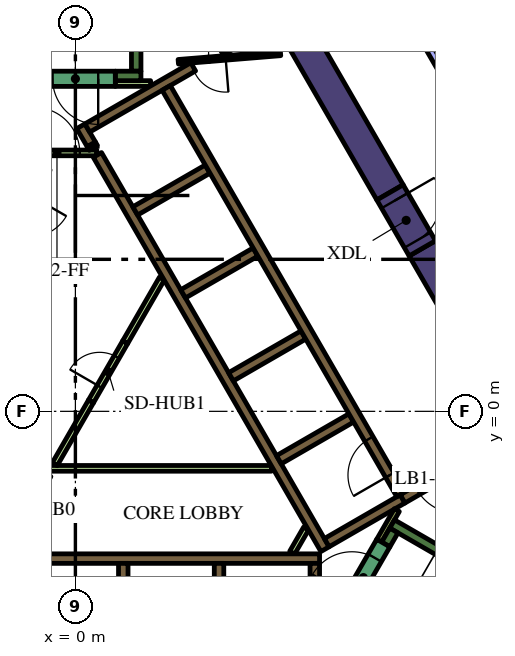
"""IFC4 building model, lengths in metres.
Left out: names, types, materials, properties, quantities, classifications, styles, units other than length and angle.
Written with IfcOpenShell. Run it as: python <this file> out.ifc"""

import sys

from ifc_helpers import new_model, si_unit, direction, frame, frame_2d, origin, place, context, subcontext, project, spatial, rectangle, extrude, element, fill, save


model = new_model("IFC4")
c1 = context("Model", 3, precision=1e-05, world=origin(), true_north=direction((0.0, 1.0)))
c2 = subcontext(c1, "Body", "Model", "MODEL_VIEW")
j1 = project(units=[si_unit("LENGTHUNIT", "METRE"), si_unit("PLANEANGLEUNIT", "RADIAN")], contexts=[c1])
p1 = place(None, origin())
s1 = spatial("IfcSite", under=j1, at=p1, CompositionType="ELEMENT")
p2 = place(p1, origin())
s2 = spatial("IfcBuilding", under=s1, at=p2, CompositionType="ELEMENT")
p3 = place(p2, frame((0.0, 0.0, 175.2)))
s3 = spatial("IfcBuildingStorey", under=s2, at=p3, CompositionType="ELEMENT", Elevation=175.2)
p4 = place(p3, frame((9.129, 4.289, 0.0), z_axis=(0.0, 0.0, 1.0), x_axis=(0.499995742806, -0.866027861663, 0.0)))
e1 = element("IfcWall", 1, at=p4, inside=s3, PredefinedType="SOLIDWALL", context=c2, shape_type="SweptSolid", body=[
    extrude(rectangle(XDim=12.527, YDim=0.8, at=frame_2d((6.264, 0.0))), origin(), (0.0, 0.0, 1.0), 4.2),
])
p5 = place(p3, frame((8.279, 5.761, 0.0), z_axis=(0.0, 0.0, 1.0), x_axis=(-0.500010359015, 0.866019422922, 0.0)))
e2 = element("IfcWall", 2, at=p5, inside=s3, PredefinedType="SOLIDWALL", context=c2, shape_type="SweptSolid", body=[
    extrude(rectangle(XDim=12.528, YDim=0.8, at=frame_2d((6.264, 0.0))), origin(), (0.0, 0.0, 1.0), 4.2),
])
p6 = place(p3, frame((8.334, -2.964, 0.0), z_axis=(0.0, 0.0, 1.0), x_axis=(0.866016039709, -0.500016218704, 0.0)))
e3 = element("IfcWall", 3, at=p6, inside=s3, PredefinedType="SOLIDWALL", context=c2, shape_type="SweptSolid", body=[
    extrude(rectangle(XDim=7.05, YDim=0.25, at=frame_2d((3.525, 0.0))), origin(), (0.0, 0.0, 1.0), 4.2),
])
p7 = place(p3, frame((8.168, -3.503, 0.0), z_axis=(0.0, 0.0, 1.0), x_axis=(0.49972245349, 0.866185586049, 0.0)))
e4 = element("IfcWall", 4, at=p7, inside=s3, PredefinedType="SOLIDWALL", context=c2, shape_type="SweptSolid", body=[
    extrude(rectangle(XDim=0.425, YDim=0.25, at=frame_2d((0.212, 0.0))), origin(), (0.0, 0.0, 1.0), 4.2),
])
p8 = place(p3, frame((1.6, 8.95, 0.0), z_axis=(0.0, 0.0, 1.0), x_axis=(0.0, 1.0, 0.0)))
e5 = element("IfcWall", 5, at=p8, inside=s3, PredefinedType="SOLIDWALL", context=c2, shape_type="SweptSolid", body=[
    extrude(rectangle(XDim=6.8, YDim=0.25, at=frame_2d((3.4, 0.0))), origin(), (0.0, 0.0, 1.0), 4.2),
])
p9 = place(p3, frame((1.05, 8.825, 0.0), z_axis=(0.0, 0.0, 1.0), x_axis=(1.0, 0.0, 0.0)))
e6 = element("IfcWall", 6, at=p9, inside=s3, PredefinedType="SOLIDWALL", context=c2, shape_type="SweptSolid", body=[
    extrude(rectangle(XDim=0.675, YDim=0.25, at=frame_2d((0.337, 0.0))), origin(), (0.0, 0.0, 1.0), 4.2),
])
p10 = place(p3, frame((-5.545, -3.875, 0.0), z_axis=(0.0, 0.0, 1.0), x_axis=(1.0, 0.0, 0.0)))
e7 = element("IfcWall", 7, at=p10, inside=s3, PredefinedType="SOLIDWALL", context=c2, shape_type="SweptSolid", body=[
    extrude(rectangle(XDim=11.97, YDim=0.25, at=frame_2d((5.985, 0.0))), origin(), (0.0, 0.0, 1.0), 4.2),
])
p11 = place(p3, frame((6.3, -7.24, 0.0), z_axis=(0.0, 0.0, 1.0), x_axis=(0.0, 1.0, 0.0)))
e8 = element("IfcWall", 8, at=p11, inside=s3, PredefinedType="SOLIDWALL", context=c2, shape_type="SweptSolid", body=[
    extrude(rectangle(XDim=3.24, YDim=0.25, at=frame_2d((1.62, 0.0))), origin(), (0.0, 0.0, 1.0), 4.2),
])
for number, where, z_axis, x_axis in (
    (9, (3.78, -4.0, 0.0), (0.0, 0.0, 1.0), (0.0, -1.0, 0.0)),
    (10, (1.26, -4.0, 0.0), (0.0, 0.0, 1.0), (0.0, -1.0, 0.0)),
):
    element("IfcWall", number, at=place(p3, frame(where, z_axis=z_axis, x_axis=x_axis)), inside=s3, PredefinedType="SOLIDWALL", context=c2, shape_type="SweptSolid", body=[
        extrude(rectangle(XDim=2.2, YDim=0.25, at=frame_2d((1.1, 0.0))), origin(), (0.0, 0.0, 1.0), 4.2),
    ])
p12 = place(p3, frame((0.473, 6.93, 0.0), z_axis=(0.0, 0.0, 1.0), x_axis=(-0.49972245349, 0.866185586049, 0.0)))
e11 = element("IfcWall", 11, at=p12, inside=s3, PredefinedType="SOLIDWALL", context=c2, shape_type="SweptSolid", body=[
    extrude(rectangle(XDim=0.11, YDim=0.25, at=frame_2d((0.055, 0.0))), origin(), (0.0, 0.0, 1.0), 4.2),
])
p13 = place(p3, frame((6.568, -3.627, 0.0), z_axis=(0.0, 0.0, 1.0), x_axis=(-0.499999455981, 0.866025717874, 0.0)))
e12 = element("IfcWall", 12, at=p13, inside=s3, PredefinedType="SOLIDWALL", context=c2, shape_type="SweptSolid", body=[
    extrude(rectangle(XDim=11.978, YDim=0.25, at=frame_2d((5.989, 0.0))), origin(), (0.0, 0.0, 1.0), 4.2),
])
p14 = place(p3, frame((0.417, 7.027, 0.0), z_axis=(0.0, 0.0, 1.0), x_axis=(-0.500210807569, 0.865903659763, 0.0)))
e13 = element("IfcWall", 13, at=p14, inside=s3, PredefinedType="SOLIDWALL", context=c2, shape_type="SweptSolid", body=[
    extrude(rectangle(XDim=0.548, YDim=0.25, at=frame_2d((0.274, 0.0))), origin(), (0.0, 0.0, 1.0), 4.2),
])
p15 = place(p3, frame((3.1, 9.064, 0.0), z_axis=(0.0, 0.0, 1.0), x_axis=(-0.866030133475, -0.499991807846, 0.0)))
e14 = element("IfcWall", 14, at=p15, inside=s3, PredefinedType="SOLIDWALL", context=c2, shape_type="SweptSolid", body=[
    extrude(rectangle(XDim=3.217, YDim=0.25, at=frame_2d((1.608, 0.0))), origin(), (0.0, 0.0, 1.0), 4.2),
])
p16 = place(p3, frame((1.574, 5.274, 0.0), z_axis=(0.0, 0.0, 1.0), x_axis=(0.866028486751, 0.499994660107, 0.0)))
e15 = element("IfcWall", 15, at=p16, inside=s3, PredefinedType="SOLIDWALL", context=c2, shape_type="SweptSolid", body=[
    extrude(rectangle(XDim=2.2, YDim=0.25, at=frame_2d((1.1, 0.0))), origin(), (0.0, 0.0, 1.0), 4.2),
])
for number, where, z_axis, x_axis in (
    (16, (2.834, 3.091, 0.0), (0.0, 0.0, 1.0), (0.866, 0.5, 0.0)),
    (17, (4.094, 0.909, 0.0), (0.0, 0.0, 1.0), (0.866, 0.5, 0.0)),
    (18, (5.354, -1.274, 0.0), (0.0, 0.0, 1.0), (0.866, 0.5, 0.0)),
):
    element("IfcWall", number, at=place(p3, frame(where, z_axis=z_axis, x_axis=x_axis)), inside=s3, PredefinedType="SOLIDWALL", context=c2, shape_type="SweptSolid", body=[
        extrude(rectangle(XDim=2.2, YDim=0.25, at=frame_2d((1.1, 0.0))), origin(), (0.0, 0.0, 1.0), 4.2),
    ])
p17 = place(p3, frame((6.614, -3.456, 0.0), z_axis=(0.0, 0.0, 1.0), x_axis=(0.866025089694, 0.500000544019, 0.0)))
e19 = element("IfcWall", 19, at=p17, inside=s3, PredefinedType="SOLIDWALL", context=c2, shape_type="SweptSolid", body=[
    extrude(rectangle(XDim=2.305, YDim=0.25, at=frame_2d((1.153, 0.0))), origin(), (0.0, 0.0, 1.0), 4.2),
])
p18 = place(p3, frame((3.83, 9.486, 0.0), z_axis=(0.0, 0.0, 1.0), x_axis=(0.865986202621, 0.500067892261, 0.0)))
e20 = element("IfcWall", 20, at=p18, inside=s3, PredefinedType="SOLIDWALL", context=c2, shape_type="SweptSolid", body=[
    extrude(rectangle(XDim=1.591, YDim=0.25, at=frame_2d((0.795, 0.0))), origin(), (0.0, 0.0, 1.0), 4.2),
])
p19 = place(p3, frame((1.05, 8.625, 0.0), z_axis=(0.0, 0.0, 1.0), x_axis=(1.0, 0.0, 0.0)))
e21 = element("IfcWall", 21, at=p19, inside=s3, PredefinedType="PARTITIONING", context=c2, shape_type="SweptSolid", body=[
    extrude(rectangle(XDim=0.929, YDim=0.15, at=frame_2d((0.464, 0.0))), origin(), (0.0, 0.0, 1.0), 3.15),
])
p20 = place(p3, frame((8.459, -2.599, 0.0), z_axis=(0.0, 0.0, 1.0), x_axis=(-0.500041054325, -0.866001699761, 0.0)))
e22 = element("IfcWall", 22, at=p20, inside=s3, PredefinedType="PARTITIONING", context=c2, shape_type="SweptSolid", body=[
    extrude(rectangle(XDim=0.929, YDim=0.15, at=frame_2d((0.464, 0.0))), origin(), (0.0, 0.0, 1.0), 4.2),
])
p21 = place(p3, frame((5.705, -3.718, 0.0), z_axis=(0.0, 0.0, 1.0), x_axis=(0.499962090823, 0.866047289552, 0.0)))
e23 = element("IfcWall", 23, at=p21, inside=s3, PredefinedType="PARTITIONING", context=c2, shape_type="SweptSolid", body=[
    extrude(rectangle(XDim=0.735, YDim=0.15, at=frame_2d((0.367, 0.0))), origin(), (0.0, 0.0, 1.0), 3.15),
])
p22 = place(p3, frame((-4.2, -1.5, 0.0), z_axis=(0.0, 0.0, 1.0), x_axis=(1.0, 0.0, 0.0)))
e24 = element("IfcWall", 24, at=p22, inside=s3, PredefinedType="PARTITIONING", context=c2, shape_type="SweptSolid", body=[
    extrude(rectangle(XDim=9.359, YDim=0.15, at=frame_2d((4.68, 0.0))), origin(), (0.0, 0.0, 1.0), 3.15),
])
p23 = place(p3, frame((-0.544, -1.393, 0.0), z_axis=(0.0, 0.0, 1.0), x_axis=(0.499928740635, 0.866066541489, 0.0)))
e25 = element("IfcWall", 25, at=p23, inside=s3, PredefinedType="PARTITIONING", context=c2, shape_type="SweptSolid", body=[
    extrude(rectangle(XDim=1.912, YDim=0.15, at=frame_2d((0.956, 0.0))), origin(), (0.0, 0.0, 1.0), 3.15),
])
p24 = place(p3, frame((1.312, 1.822, 0.0), z_axis=(0.0, 0.0, 1.0), x_axis=(0.500003549559, 0.866023354436, 0.0)))
e26 = element("IfcWall", 26, at=p24, inside=s3, PredefinedType="PARTITIONING", context=c2, shape_type="SweptSolid", body=[
    extrude(rectangle(XDim=1.93, YDim=0.15, at=frame_2d((0.965, 0.0))), origin(), (0.0, 0.0, 1.0), 3.15),
])
p25 = place(p3, frame((8.565, -2.185, 0.0), z_axis=(0.0, 0.0, 1.0), x_axis=(-0.499997954832, 0.866026584559, 0.0)))
e27 = element("IfcWall", 27, at=p25, inside=s3, PredefinedType="SOLIDWALL", context=c2, shape_type="SweptSolid", body=[
    extrude(rectangle(XDim=12.35, YDim=0.25, at=frame_2d((6.175, 0.0))), origin(), (0.0, 0.0, 1.0), 4.2),
])
p26 = place(p25, frame((0.585, 0.0, 0.0)))
e28 = element("IfcOpeningElement", 28, at=p26, cuts=e27, PredefinedType="OPENING", context=c2, shape_type="SweptSolid", body=[
    extrude(rectangle(XDim=1.1, YDim=2.1, at=frame_2d((0.55, 1.05))), frame((0.0, 0.135, 0.0), z_axis=(0.0, -1.0, 0.0), x_axis=(1.0, 0.0, 0.0)), (0.0, 0.0, 1.0), 0.27),
])
p27 = place(p3, frame((7.053, -5.284, 0.0), z_axis=(0.0, 0.0, 1.0), x_axis=(0.500078061341, 0.865980330357, 0.0)))
e29 = element("IfcWall", 29, at=p27, inside=s3, PredefinedType="SOLIDWALL", context=c2, shape_type="SweptSolid", body=[
    extrude(rectangle(XDim=2.1, YDim=0.4, at=frame_2d((1.05, 0.0))), origin(), (0.0, 0.0, 1.0), 4.2),
])
p28 = place(p27, frame((0.45, 0.0, 0.0)))
e30 = element("IfcOpeningElement", 30, at=p28, cuts=e29, PredefinedType="OPENING", context=c2, shape_type="SweptSolid", body=[
    extrude(rectangle(XDim=1.2, YDim=2.1, at=frame_2d((0.6, 1.05))), frame((0.0, 0.21, 0.0), z_axis=(0.0, -1.0, 0.0), x_axis=(1.0, 0.0, 0.0)), (0.0, 0.0, 1.0), 0.42),
])
p29 = place(p3, frame((1.05, 8.75, 0.0), z_axis=(0.0, 0.0, 1.0), x_axis=(-1.0, 0.0, 0.0)))
e31 = element("IfcWall", 31, at=p29, inside=s3, PredefinedType="SOLIDWALL", context=c2, shape_type="SweptSolid", body=[
    extrude(rectangle(XDim=2.1, YDim=0.4, at=frame_2d((1.05, 0.0))), origin(), (0.0, 0.0, 1.0), 4.2),
])
p30 = place(p29, frame((0.45, 0.0, 0.0)))
e32 = element("IfcOpeningElement", 32, at=p30, cuts=e31, PredefinedType="OPENING", context=c2, shape_type="SweptSolid", body=[
    extrude(rectangle(XDim=1.2, YDim=2.1, at=frame_2d((0.6, 1.05))), frame((0.0, 0.21, 0.0), z_axis=(0.0, -1.0, 0.0), x_axis=(1.0, 0.0, 0.0)), (0.0, 0.0, 1.0), 0.42),
])
p31 = place(p3, frame((5.398, 9.419, 0.0), z_axis=(0.0, 0.0, 1.0), x_axis=(-0.996653416376, -0.081743303248, 0.0)))
e33 = element("IfcWall", 33, at=p31, inside=s3, PredefinedType="PARTITIONING", context=c2, shape_type="SweptSolid", body=[
    extrude(rectangle(XDim=2.7, YDim=0.12, at=frame_2d((1.35, 0.0))), origin(), (0.0, 0.0, 1.0), 3.15),
])
p32 = place(p31, frame((1.45, 0.0, 0.0)))
e34 = element("IfcOpeningElement", 34, at=p32, cuts=e33, PredefinedType="OPENING", context=c2, shape_type="SweptSolid", body=[
    extrude(rectangle(XDim=0.9, YDim=2.1, at=frame_2d((0.45, 1.05))), frame((0.0, 0.07, 0.0), z_axis=(0.0, -1.0, 0.0), x_axis=(1.0, 0.0, 0.0)), (0.0, 0.0, 1.0), 0.14),
])
p33 = place(p3, frame((-1.534, 6.8, 0.0), z_axis=(0.0, 0.0, 1.0), x_axis=(1.0, 0.0, 0.0)))
e35 = element("IfcWall", 35, at=p33, inside=s3, PredefinedType="PARTITIONING", context=c2, shape_type="SweptSolid", body=[
    extrude(rectangle(XDim=2.1, YDim=0.15, at=frame_2d((1.05, 0.0))), origin(), (0.0, 0.0, 1.0), 3.15),
])
p34 = place(p33, frame((0.45, 0.0, 0.0)))
e36 = element("IfcOpeningElement", 36, at=p34, cuts=e35, PredefinedType="OPENING", context=c2, shape_type="SweptSolid", body=[
    extrude(rectangle(XDim=1.2, YDim=2.1, at=frame_2d((0.6, 1.05))), frame((0.0, 0.085, 0.0), z_axis=(0.0, -1.0, 0.0), x_axis=(1.0, 0.0, 0.0)), (0.0, 0.0, 1.0), 0.17),
])
p35 = place(p3, frame((10.429, -1.253, 0.0), z_axis=(0.0, 0.0, 1.0), x_axis=(-0.866009402589, -0.500027713859, 0.0)))
e37 = element("IfcWall", 37, at=p35, inside=s3, PredefinedType="SOLIDWALL", context=c2, shape_type="SweptSolid", body=[
    extrude(rectangle(XDim=2.1, YDim=0.25, at=frame_2d((1.05, 0.0))), origin(), (0.0, 0.0, 1.0), 4.2),
])
p36 = place(p35, frame((0.45, 0.0, 0.0)))
e38 = element("IfcOpeningElement", 38, at=p36, cuts=e37, PredefinedType="OPENING", context=c2, shape_type="SweptSolid", body=[
    extrude(rectangle(XDim=1.2, YDim=2.1, at=frame_2d((0.6, 1.05))), frame((0.0, 0.135, 0.0), z_axis=(0.0, -1.0, 0.0), x_axis=(1.0, 0.0, 0.0)), (0.0, 0.0, 1.0), 0.27),
])
p37 = place(p3, frame((8.279, 5.761, 0.0), z_axis=(0.0, 0.0, 1.0), x_axis=(0.500062241894, -0.865989465428, 0.0)))
e39 = element("IfcWall", 39, at=p37, inside=s3, PredefinedType="SOLIDWALL", context=c2, shape_type="SweptSolid", body=[
    extrude(rectangle(XDim=1.7, YDim=0.8, at=frame_2d((0.85, 0.0))), origin(), (0.0, 0.0, 1.0), 4.2),
])
p38 = place(p37, frame((0.25, 0.0, 0.0)))
e40 = element("IfcOpeningElement", 40, at=p38, cuts=e39, PredefinedType="OPENING", context=c2, shape_type="SweptSolid", body=[
    extrude(rectangle(XDim=1.2, YDim=2.1, at=frame_2d((0.6, 1.05))), frame((0.0, 0.41, 0.0), z_axis=(0.0, -1.0, 0.0), x_axis=(1.0, 0.0, 0.0)), (0.0, 0.0, 1.0), 0.82),
])
p39 = place(p3, frame((0.412, 0.263, 0.0), z_axis=(0.0, 0.0, 1.0), x_axis=(0.500062916607, 0.865989075817, 0.0)))
e41 = element("IfcWall", 41, at=p39, inside=s3, PredefinedType="PARTITIONING", context=c2, shape_type="SweptSolid", body=[
    extrude(rectangle(XDim=1.8, YDim=0.15, at=frame_2d((0.9, 0.0))), origin(), (0.0, 0.0, 1.0), 3.15),
])
p40 = place(p39, frame((0.45, 0.0, 0.0)))
e42 = element("IfcOpeningElement", 42, at=p40, cuts=e41, PredefinedType="OPENING", context=c2, shape_type="SweptSolid", body=[
    extrude(rectangle(XDim=0.9, YDim=2.1, at=frame_2d((0.45, 1.05))), frame((0.0, 0.085, 0.0), z_axis=(0.0, -1.0, 0.0), x_axis=(1.0, 0.0, 0.0)), (0.0, 0.0, 1.0), 0.17),
])
p41 = place(p3, frame((13.13, 2.958, 0.0), z_axis=(0.0, 0.0, 1.0), x_axis=(-0.499995158272, 0.866028199139, 0.0)))
e43 = element("IfcWall", 43, at=p41, inside=s3, PredefinedType="PARTITIONING", context=c2, shape_type="SweptSolid", body=[
    extrude(rectangle(XDim=8.008, YDim=0.2, at=frame_2d((4.004, 0.0))), origin(), (0.0, 0.0, 1.0), 3.15),
])
p42 = place(p26, origin())
e44 = element("IfcDoor", 44, at=p42, inside=s3, OperationType="DOUBLE_DOOR_SLIDING", PredefinedType="DOOR", context=c2, shape_type="SweptSolid", body=[
    extrude(rectangle(XDim=1.1, YDim=2.1, at=frame_2d((0.55, 1.05))), frame((0.0, 0.025, 0.0), z_axis=(0.0, -1.0, 0.0), x_axis=(1.0, 0.0, 0.0)), (0.0, 0.0, 1.0), 0.05),
])
fill(e28, e44)
p43 = place(p28, origin())
e45 = element("IfcDoor", 45, at=p43, inside=s3, OperationType="SINGLE_SWING_LEFT", PredefinedType="DOOR", context=c2, shape_type="SweptSolid", body=[
    extrude(rectangle(XDim=1.2, YDim=2.1, at=frame_2d((0.6, 1.05))), frame((0.0, 0.025, 0.0), z_axis=(0.0, -1.0, 0.0), x_axis=(1.0, 0.0, 0.0)), (0.0, 0.0, 1.0), 0.05),
])
fill(e30, e45)
p44 = place(p30, origin())
e46 = element("IfcDoor", 46, at=p44, inside=s3, OperationType="SINGLE_SWING_LEFT", PredefinedType="DOOR", context=c2, shape_type="SweptSolid", body=[
    extrude(rectangle(XDim=1.2, YDim=2.1, at=frame_2d((0.6, 1.05))), frame((0.0, 0.025, 0.0), z_axis=(0.0, -1.0, 0.0), x_axis=(1.0, 0.0, 0.0)), (0.0, 0.0, 1.0), 0.05),
])
fill(e32, e46)
p45 = place(p32, origin())
e47 = element("IfcDoor", 47, at=p45, inside=s3, OperationType="SINGLE_SWING_LEFT", PredefinedType="DOOR", context=c2, shape_type="SweptSolid", body=[
    extrude(rectangle(XDim=0.9, YDim=2.1, at=frame_2d((0.45, 1.05))), frame((0.0, 0.025, 0.0), z_axis=(0.0, -1.0, 0.0), x_axis=(1.0, 0.0, 0.0)), (0.0, 0.0, 1.0), 0.05),
])
fill(e34, e47)
p46 = place(p34, origin())
e48 = element("IfcDoor", 48, at=p46, inside=s3, OperationType="SINGLE_SWING_LEFT", PredefinedType="DOOR", context=c2, shape_type="SweptSolid", body=[
    extrude(rectangle(XDim=1.2, YDim=2.1, at=frame_2d((0.6, 1.05))), frame((0.0, 0.025, 0.0), z_axis=(0.0, -1.0, 0.0), x_axis=(1.0, 0.0, 0.0)), (0.0, 0.0, 1.0), 0.05),
])
fill(e36, e48)
p47 = place(p36, origin())
e49 = element("IfcDoor", 49, at=p47, inside=s3, OperationType="SINGLE_SWING_LEFT", PredefinedType="DOOR", context=c2, shape_type="SweptSolid", body=[
    extrude(rectangle(XDim=1.2, YDim=2.1, at=frame_2d((0.6, 1.05))), frame((0.0, 0.025, 0.0), z_axis=(0.0, -1.0, 0.0), x_axis=(1.0, 0.0, 0.0)), (0.0, 0.0, 1.0), 0.05),
])
fill(e38, e49)
p48 = place(p38, origin())
e50 = element("IfcDoor", 50, at=p48, inside=s3, OperationType="SINGLE_SWING_LEFT", PredefinedType="DOOR", context=c2, shape_type="SweptSolid", body=[
    extrude(rectangle(XDim=1.2, YDim=2.1, at=frame_2d((0.6, 1.05))), frame((0.0, 0.025, 0.0), z_axis=(0.0, -1.0, 0.0), x_axis=(1.0, 0.0, 0.0)), (0.0, 0.0, 1.0), 0.05),
])
fill(e40, e50)
p49 = place(p40, origin())
e51 = element("IfcDoor", 51, at=p49, inside=s3, OperationType="SINGLE_SWING_LEFT", PredefinedType="DOOR", context=c2, shape_type="SweptSolid", body=[
    extrude(rectangle(XDim=0.9, YDim=2.1, at=frame_2d((0.45, 1.05))), frame((0.0, 0.025, 0.0), z_axis=(0.0, -1.0, 0.0), x_axis=(1.0, 0.0, 0.0)), (0.0, 0.0, 1.0), 0.05),
])
fill(e42, e51)
save(model, sys.argv[1])
